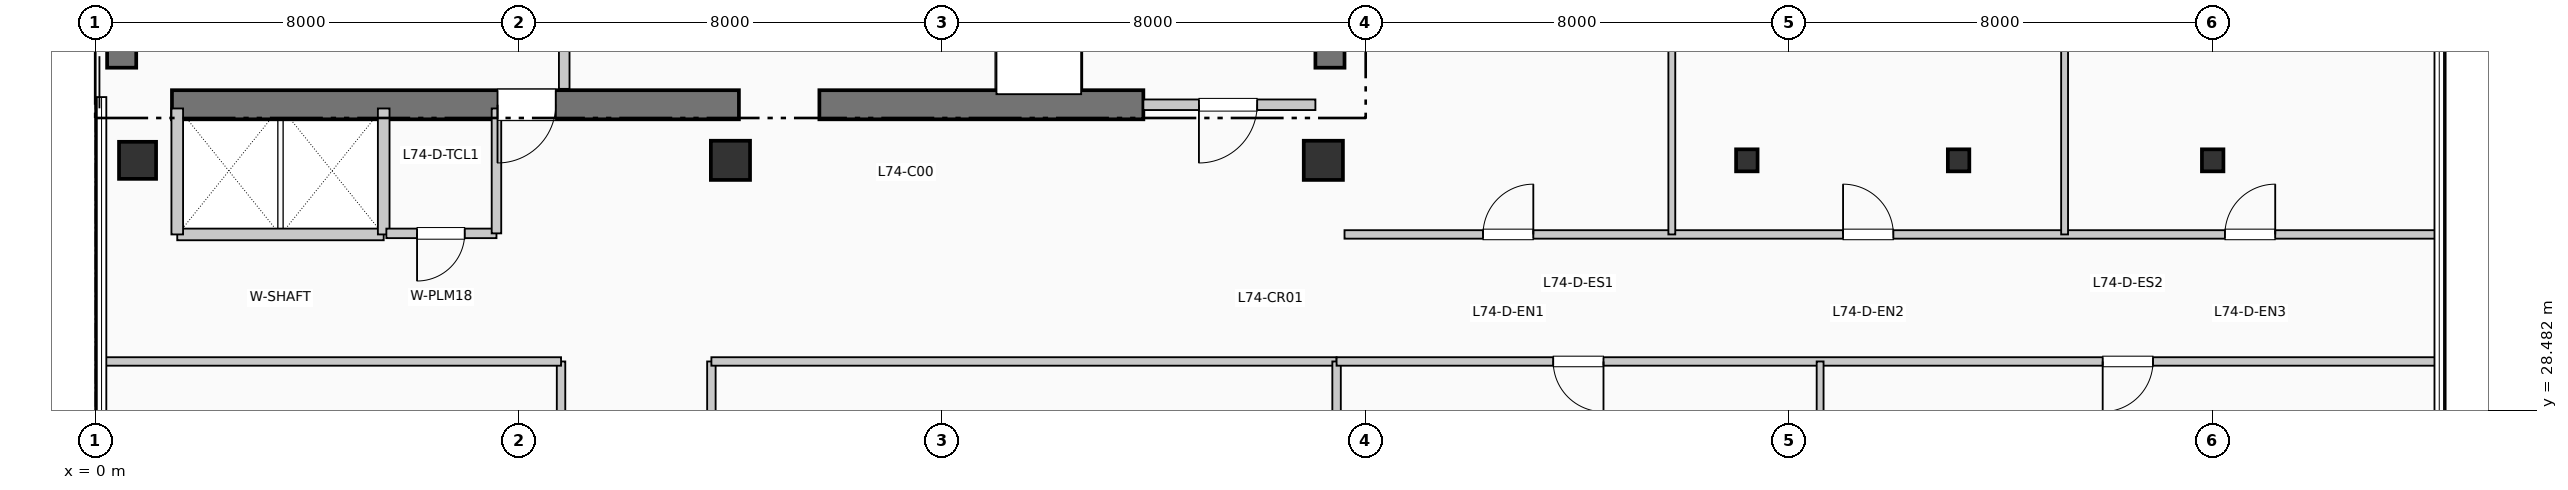
"""IFC4 building model, lengths in metres.
Left out: names, types, materials, properties, quantities, classifications, styles, units other than length and angle.
Written with IfcOpenShell. Run it as: python <this file> out.ifc"""

import sys

from ifc_helpers import new_model, si_unit, direction, frame, frame_2d, origin, origin_2d, place, context, subcontext, project, spatial, rectangle, i_section, extrude, element, fill, save


model = new_model("IFC4")
c1 = context("Model", 3, precision=1e-05, world=origin(), true_north=direction((0.0, 1.0)))
c2 = subcontext(c1, "Body", "Model", "MODEL_VIEW")
j1 = project(units=[si_unit("LENGTHUNIT", "METRE"), si_unit("PLANEANGLEUNIT", "RADIAN")], contexts=[c1])
p1 = place(None, origin())
s1 = spatial("IfcSite", under=j1, at=p1, CompositionType="ELEMENT")
p2 = place(p1, origin())
s2 = spatial("IfcBuilding", under=s1, at=p2, CompositionType="ELEMENT")
p3 = place(p2, frame((0.0, 0.0, 303.93)))
s3 = spatial("IfcBuildingStorey", under=s2, at=p3, CompositionType="ELEMENT", Elevation=303.93)
p4 = place(p3, frame((0.5, 34.95, 0.0), z_axis=(0.0, 0.0, 1.0), x_axis=(0.0, 1.0, 0.0)))
e1 = element("IfcWall", 1, at=p4, inside=s3, PredefinedType="SHEAR", context=c2, shape_type="SweptSolid", body=[
    extrude(rectangle(XDim=7.9, YDim=0.55, at=frame_2d((3.95, 0.0))), origin(), (0.0, 0.0, 1.0), 3.96),
])
p5 = place(p3, frame((23.325, 34.95, 0.0), z_axis=(0.0, 0.0, 1.0), x_axis=(0.0, 1.0, 0.0)))
e2 = element("IfcWall", 2, at=p5, inside=s3, PredefinedType="SHEAR", context=c2, shape_type="SweptSolid", body=[
    extrude(rectangle(XDim=10.64, YDim=0.55, at=frame_2d((5.32, 0.0))), origin(), (0.0, 0.0, 1.0), 3.96),
])
p6 = place(p3, frame((1.45, 34.25, 0.0), z_axis=(0.0, 0.0, 1.0), x_axis=(1.0, 0.0, 0.0)))
e3 = element("IfcWall", 3, at=p6, inside=s3, PredefinedType="SHEAR", context=c2, shape_type="SweptSolid", body=[
    extrude(rectangle(XDim=10.71, YDim=0.55, at=frame_2d((5.355, 0.0))), origin(), (0.0, 0.0, 1.0), 3.96),
])
p7 = place(p6, frame((7.25, 0.0, 0.0), z_axis=(0.0, 0.0, 1.0), x_axis=(-1.0, 0.0, 0.0)))
e4 = element("IfcOpeningElement", 4, at=p7, cuts=e3, PredefinedType="OPENING", context=c2, shape_type="SweptSolid", body=[
    extrude(rectangle(XDim=1.1, YDim=2.15, at=frame_2d((0.55, 1.075))), frame((0.0, 0.285, 0.0), z_axis=(0.0, -1.0, 0.0), x_axis=(1.0, 0.0, 0.0)), (0.0, 0.0, 1.0), 0.57),
])
p8 = place(p3, frame((13.68, 34.25, 0.0), z_axis=(0.0, 0.0, 1.0), x_axis=(1.0, 0.0, 0.0)))
e5 = element("IfcWall", 5, at=p8, inside=s3, PredefinedType="SHEAR", context=c2, shape_type="SweptSolid", body=[
    extrude(rectangle(XDim=6.12, YDim=0.55, at=frame_2d((3.06, 0.0))), origin(), (0.0, 0.0, 1.0), 3.96),
])
p9 = place(p3, frame((0.8, 33.2, 0.0), z_axis=(0.0, 0.0, 1.0), x_axis=(1.0, 0.0, 0.0)))
e6 = element("IfcColumn", 6, at=p9, inside=s3, PredefinedType="COLUMN", context=c2, shape_type="SweptSolid", body=[
    extrude(rectangle(XDim=0.7, YDim=0.7, at=origin_2d()), origin(), (0.0, 0.0, 1.0), 3.96),
])
for number, where, z_axis, x_axis in (
    (7, (12.0, 33.2, 0.0), (0.0, 0.0, 1.0), (1.0, 0.0, 0.0)),
    (8, (23.2, 33.2, 0.0), (0.0, 0.0, 1.0), (1.0, 0.0, 0.0)),
):
    element("IfcColumn", number, at=place(p3, frame(where, z_axis=z_axis, x_axis=x_axis)), inside=s3, PredefinedType="COLUMN", context=c2, shape_type="SweptSolid", body=[
        extrude(rectangle(XDim=0.74, YDim=0.74, at=origin_2d()), origin(), (0.0, 0.0, 1.0), 3.96),
    ])
for number, where, z_axis, x_axis in (
    (9, (31.2, 33.2, 0.0), (0.0, 0.0, 1.0), (1.0, 0.0, 0.0)),
    (10, (35.2, 33.2, 0.0), (0.0, 0.0, 1.0), (1.0, 0.0, 0.0)),
    (11, (40.0, 33.2, 0.0), (0.0, 0.0, 1.0), (1.0, 0.0, 0.0)),
):
    element("IfcColumn", number, at=place(p3, frame(where, z_axis=z_axis, x_axis=x_axis)), inside=s3, PredefinedType="COLUMN", context=c2, shape_type="SweptSolid", body=[
        extrude(i_section(OverallWidth=0.406, OverallDepth=0.416, WebThickness=0.022, FlangeThickness=0.036, at=origin_2d()), origin(), (0.0, 0.0, 1.0), 3.96),
    ])
p10 = place(p3, frame((8.86, 34.55, 0.0), z_axis=(0.0, 0.0, 1.0), x_axis=(0.0, 1.0, 0.0)))
e12 = element("IfcWall", 12, at=p10, inside=s3, PredefinedType="PARTITIONING", context=c2, shape_type="SweptSolid", body=[
    extrude(rectangle(XDim=2.5, YDim=0.2, at=frame_2d((1.25, 0.0))), origin(), (0.0, 0.0, 1.0), 3.74),
])
p11 = place(p3, frame((19.8, 34.25, 0.0), z_axis=(0.0, 0.0, 1.0), x_axis=(1.0, 0.0, 0.0)))
e13 = element("IfcWall", 13, at=p11, inside=s3, PredefinedType="PARTITIONING", context=c2, shape_type="SweptSolid", body=[
    extrude(rectangle(XDim=3.25, YDim=0.2, at=frame_2d((1.625, 0.0))), origin(), (0.0, 0.0, 1.0), 3.74),
])
p12 = place(p11, frame((2.15, 0.0, 0.0), z_axis=(0.0, 0.0, 1.0), x_axis=(-1.0, 0.0, 0.0)))
e14 = element("IfcOpeningElement", 14, at=p12, cuts=e13, PredefinedType="OPENING", context=c2, shape_type="SweptSolid", body=[
    extrude(rectangle(XDim=1.1, YDim=2.15, at=frame_2d((0.55, 1.075))), frame((0.0, 0.11, 0.0), z_axis=(0.0, -1.0, 0.0), x_axis=(1.0, 0.0, 0.0)), (0.0, 0.0, 1.0), 0.22),
])
p13 = place(p3, frame((1.55, 31.8, 0.0), z_axis=(0.0, 0.0, 1.0), x_axis=(1.0, 0.0, 0.0)))
e15 = element("IfcWall", 15, at=p13, inside=s3, PredefinedType="PARTITIONING", context=c2, shape_type="SweptSolid", body=[
    extrude(rectangle(XDim=3.9, YDim=0.22, at=frame_2d((1.95, 0.0))), origin(), (0.0, 0.0, 1.0), 3.74),
])
for number, where, z_axis, x_axis in (
    (16, (1.55, 31.8, 0.0), (0.0, 0.0, 1.0), (0.0, 1.0, 0.0)),
    (17, (5.45, 31.8, 0.0), (0.0, 0.0, 1.0), (0.0, 1.0, 0.0)),
):
    element("IfcWall", number, at=place(p3, frame(where, z_axis=z_axis, x_axis=x_axis)), inside=s3, PredefinedType="PARTITIONING", context=c2, shape_type="SweptSolid", body=[
        extrude(rectangle(XDim=2.38, YDim=0.22, at=frame_2d((1.19, 0.0))), origin(), (0.0, 0.0, 1.0), 3.74),
    ])
p14 = place(p3, frame((5.5, 31.82, 0.0), z_axis=(0.0, 0.0, 1.0), x_axis=(1.0, 0.0, 0.0)))
e18 = element("IfcWall", 18, at=p14, inside=s3, PredefinedType="PLUMBINGWALL", context=c2, shape_type="SweptSolid", body=[
    extrude(rectangle(XDim=2.08, YDim=0.18, at=frame_2d((1.04, 0.0))), origin(), (0.0, 0.0, 1.0), 3.74),
])
p15 = place(p14, frame((1.48, 0.0, 0.0), z_axis=(0.0, 0.0, 1.0), x_axis=(-1.0, 0.0, 0.0)))
e19 = element("IfcOpeningElement", 19, at=p15, cuts=e18, PredefinedType="OPENING", context=c2, shape_type="SweptSolid", body=[
    extrude(rectangle(XDim=0.9, YDim=2.1, at=frame_2d((0.45, 1.05))), frame((0.0, 0.1, 0.0), z_axis=(0.0, -1.0, 0.0), x_axis=(1.0, 0.0, 0.0)), (0.0, 0.0, 1.0), 0.2),
])
p16 = place(p3, frame((7.58, 31.82, 0.0), z_axis=(0.0, 0.0, 1.0), x_axis=(0.0, 1.0, 0.0)))
e20 = element("IfcWall", 20, at=p16, inside=s3, PredefinedType="PLUMBINGWALL", context=c2, shape_type="SweptSolid", body=[
    extrude(rectangle(XDim=2.36, YDim=0.18, at=frame_2d((1.18, 0.0))), origin(), (0.0, 0.0, 1.0), 3.74),
])
p17 = place(p3, frame((8.8, 12.6, 0.0), z_axis=(0.0, 0.0, 1.0), x_axis=(0.0, 1.0, 0.0)))
e21 = element("IfcWall", 21, at=p17, inside=s3, PredefinedType="PARTITIONING", context=c2, shape_type="SweptSolid", body=[
    extrude(rectangle(XDim=16.8, YDim=0.16, at=frame_2d((8.4, 0.0))), origin(), (0.0, 0.0, 1.0), 3.74),
])
p18 = place(p17, frame((4.339, 0.0, 0.0), z_axis=(0.0, 0.0, 1.0), x_axis=(-1.0, 0.0, 0.0)))
e22 = element("IfcOpeningElement", 22, at=p18, cuts=e21, PredefinedType="OPENING", context=c2, shape_type="SweptSolid", body=[
    extrude(rectangle(XDim=0.95, YDim=2.15, at=frame_2d((0.475, 1.075))), frame((0.0, 0.09, 0.0), z_axis=(0.0, -1.0, 0.0), x_axis=(1.0, 0.0, 0.0)), (0.0, 0.0, 1.0), 0.18),
])
p19 = place(p17, frame((12.739, 0.0, 0.0), z_axis=(0.0, 0.0, 1.0), x_axis=(-1.0, 0.0, 0.0)))
e23 = element("IfcOpeningElement", 23, at=p19, cuts=e21, PredefinedType="OPENING", context=c2, shape_type="SweptSolid", body=[
    extrude(rectangle(XDim=0.95, YDim=2.15, at=frame_2d((0.475, 1.075))), frame((0.0, 0.09, 0.0), z_axis=(0.0, -1.0, 0.0), x_axis=(1.0, 0.0, 0.0)), (0.0, 0.0, 1.0), 0.18),
])
p20 = place(p3, frame((11.64, 12.6, 0.0), z_axis=(0.0, 0.0, 1.0), x_axis=(0.0, 1.0, 0.0)))
e24 = element("IfcWall", 24, at=p20, inside=s3, PredefinedType="PARTITIONING", context=c2, shape_type="SweptSolid", body=[
    extrude(rectangle(XDim=16.8, YDim=0.16, at=frame_2d((8.4, 0.0))), origin(), (0.0, 0.0, 1.0), 3.175),
])
p21 = place(p20, frame((3.381, 0.0, 0.0)))
e25 = element("IfcOpeningElement", 25, at=p21, cuts=e24, PredefinedType="OPENING", context=c2, shape_type="SweptSolid", body=[
    extrude(rectangle(XDim=0.95, YDim=2.15, at=frame_2d((0.475, 1.075))), frame((0.0, 0.09, 0.0), z_axis=(0.0, -1.0, 0.0), x_axis=(1.0, 0.0, 0.0)), (0.0, 0.0, 1.0), 0.18),
])
p22 = place(p20, frame((7.593, 0.0, 0.0)))
e26 = element("IfcOpeningElement", 26, at=p22, cuts=e24, PredefinedType="OPENING", context=c2, shape_type="SweptSolid", body=[
    extrude(rectangle(XDim=0.95, YDim=2.15, at=frame_2d((0.475, 1.075))), frame((0.0, 0.09, 0.0), z_axis=(0.0, -1.0, 0.0), x_axis=(1.0, 0.0, 0.0)), (0.0, 0.0, 1.0), 0.18),
])
p23 = place(p20, frame((13.637, 0.0, 0.0)))
e27 = element("IfcOpeningElement", 27, at=p23, cuts=e24, PredefinedType="OPENING", context=c2, shape_type="SweptSolid", body=[
    extrude(rectangle(XDim=0.95, YDim=2.15, at=frame_2d((0.475, 1.075))), frame((0.0, 0.09, 0.0), z_axis=(0.0, -1.0, 0.0), x_axis=(1.0, 0.0, 0.0)), (0.0, 0.0, 1.0), 0.18),
])
p24 = place(p3, frame((0.19, 29.4, 0.0), z_axis=(0.0, 0.0, 1.0), x_axis=(1.0, 0.0, 0.0)))
e28 = element("IfcWall", 28, at=p24, inside=s3, PredefinedType="PARTITIONING", context=c2, shape_type="SweptSolid", body=[
    extrude(rectangle(XDim=8.61, YDim=0.16, at=frame_2d((4.305, 0.0))), origin(), (0.0, 0.0, 1.0), 3.425),
])
p25 = place(p3, frame((11.64, 29.4, 0.0), z_axis=(0.0, 0.0, 1.0), x_axis=(1.0, 0.0, 0.0)))
e29 = element("IfcWall", 29, at=p25, inside=s3, PredefinedType="PARTITIONING", context=c2, shape_type="SweptSolid", body=[
    extrude(rectangle(XDim=11.81, YDim=0.16, at=frame_2d((5.905, 0.0))), origin(), (0.0, 0.0, 1.0), 3.425),
])
p26 = place(p3, frame((23.45, 5.99, 0.0), z_axis=(0.0, 0.0, 1.0), x_axis=(0.0, 1.0, 0.0)))
e30 = element("IfcWall", 30, at=p26, inside=s3, PredefinedType="PARTITIONING", context=c2, shape_type="SweptSolid", body=[
    extrude(rectangle(XDim=23.41, YDim=0.16, at=frame_2d((11.705, 0.0))), origin(), (0.0, 0.0, 1.0), 3.175),
])
p27 = place(p3, frame((23.45, 29.4, 0.0), z_axis=(0.0, 0.0, 1.0), x_axis=(1.0, 0.0, 0.0)))
e31 = element("IfcWall", 31, at=p27, inside=s3, PredefinedType="PARTITIONING", context=c2, shape_type="SweptSolid", body=[
    extrude(rectangle(XDim=20.76, YDim=0.16, at=frame_2d((10.38, 0.0))), origin(), (0.0, 0.0, 1.0), 3.425),
])
p28 = place(p27, frame((5.042, 0.0, 0.0), z_axis=(0.0, 0.0, 1.0), x_axis=(-1.0, 0.0, 0.0)))
e32 = element("IfcOpeningElement", 32, at=p28, cuts=e31, PredefinedType="OPENING", context=c2, shape_type="SweptSolid", body=[
    extrude(rectangle(XDim=0.95, YDim=2.15, at=frame_2d((0.475, 1.075))), frame((0.0, 0.09, 0.0), z_axis=(0.0, -1.0, 0.0), x_axis=(1.0, 0.0, 0.0)), (0.0, 0.0, 1.0), 0.18),
])
p29 = place(p27, frame((15.422, 0.0, 0.0), z_axis=(0.0, 0.0, 1.0), x_axis=(-1.0, 0.0, 0.0)))
e33 = element("IfcOpeningElement", 33, at=p29, cuts=e31, PredefinedType="OPENING", context=c2, shape_type="SweptSolid", body=[
    extrude(rectangle(XDim=0.95, YDim=2.15, at=frame_2d((0.475, 1.075))), frame((0.0, 0.09, 0.0), z_axis=(0.0, -1.0, 0.0), x_axis=(1.0, 0.0, 0.0)), (0.0, 0.0, 1.0), 0.18),
])
p30 = place(p3, frame((23.6, 31.8, 0.0), z_axis=(0.0, 0.0, 1.0), x_axis=(1.0, 0.0, 0.0)))
e34 = element("IfcWall", 34, at=p30, inside=s3, PredefinedType="PARTITIONING", context=c2, shape_type="SweptSolid", body=[
    extrude(rectangle(XDim=20.61, YDim=0.16, at=frame_2d((10.305, 0.0))), origin(), (0.0, 0.0, 1.0), 3.74),
])
p31 = place(p30, frame((2.616, 0.0, 0.0)))
e35 = element("IfcOpeningElement", 35, at=p31, cuts=e34, PredefinedType="OPENING", context=c2, shape_type="SweptSolid", body=[
    extrude(rectangle(XDim=0.95, YDim=2.15, at=frame_2d((0.475, 1.075))), frame((0.0, 0.09, 0.0), z_axis=(0.0, -1.0, 0.0), x_axis=(1.0, 0.0, 0.0)), (0.0, 0.0, 1.0), 0.18),
])
p32 = place(p30, frame((9.418, 0.0, 0.0)))
e36 = element("IfcOpeningElement", 36, at=p32, cuts=e34, PredefinedType="OPENING", context=c2, shape_type="SweptSolid", body=[
    extrude(rectangle(XDim=0.95, YDim=2.15, at=frame_2d((0.475, 1.075))), frame((0.0, 0.09, 0.0), z_axis=(0.0, -1.0, 0.0), x_axis=(1.0, 0.0, 0.0)), (0.0, 0.0, 1.0), 0.18),
])
p33 = place(p30, frame((16.631, 0.0, 0.0)))
e37 = element("IfcOpeningElement", 37, at=p33, cuts=e34, PredefinedType="OPENING", context=c2, shape_type="SweptSolid", body=[
    extrude(rectangle(XDim=0.95, YDim=2.15, at=frame_2d((0.475, 1.075))), frame((0.0, 0.09, 0.0), z_axis=(0.0, -1.0, 0.0), x_axis=(1.0, 0.0, 0.0)), (0.0, 0.0, 1.0), 0.18),
])
p34 = place(p3, frame((32.584, 25.19, 0.0), z_axis=(0.0, 0.0, 1.0), x_axis=(0.0, 1.0, 0.0)))
e38 = element("IfcWall", 38, at=p34, inside=s3, PredefinedType="PARTITIONING", context=c2, shape_type="SweptSolid", body=[
    extrude(rectangle(XDim=4.21, YDim=0.13, at=frame_2d((2.105, 0.0))), origin(), (0.0, 0.0, 1.0), 3.74),
])
for number, where, z_axis, x_axis in (
    (39, (29.783, 31.8, 0.0), (0.0, 0.0, 1.0), (0.0, 1.0, 0.0)),
    (40, (37.203, 31.8, 0.0), (0.0, 0.0, 1.0), (0.0, 1.0, 0.0)),
):
    element("IfcWall", number, at=place(p3, frame(where, z_axis=z_axis, x_axis=x_axis)), inside=s3, PredefinedType="PARTITIONING", context=c2, shape_type="SweptSolid", body=[
        extrude(rectangle(XDim=14.01, YDim=0.13, at=frame_2d((7.005, 0.0))), origin(), (0.0, 0.0, 1.0), 3.74),
    ])
p35 = place(p7, origin())
e41 = element("IfcDoor", 41, at=p35, inside=s3, OperationType="SINGLE_SWING_LEFT", PredefinedType="DOOR", context=c2, shape_type="SweptSolid", body=[
    extrude(rectangle(XDim=1.1, YDim=2.15, at=frame_2d((0.55, 1.075))), frame((0.0, 0.025, 0.0), z_axis=(0.0, -1.0, 0.0), x_axis=(1.0, 0.0, 0.0)), (0.0, 0.0, 1.0), 0.05),
])
fill(e4, e41)
p36 = place(p12, origin())
e42 = element("IfcDoor", 42, at=p36, inside=s3, OperationType="SINGLE_SWING_LEFT", PredefinedType="DOOR", context=c2, shape_type="SweptSolid", body=[
    extrude(rectangle(XDim=1.1, YDim=2.15, at=frame_2d((0.55, 1.075))), frame((0.0, 0.025, 0.0), z_axis=(0.0, -1.0, 0.0), x_axis=(1.0, 0.0, 0.0)), (0.0, 0.0, 1.0), 0.05),
])
fill(e14, e42)
p37 = place(p15, origin())
e43 = element("IfcDoor", 43, at=p37, inside=s3, OperationType="SINGLE_SWING_LEFT", PredefinedType="DOOR", context=c2, shape_type="SweptSolid", body=[
    extrude(rectangle(XDim=0.9, YDim=2.1, at=frame_2d((0.45, 1.05))), frame((0.0, 0.025, 0.0), z_axis=(0.0, -1.0, 0.0), x_axis=(1.0, 0.0, 0.0)), (0.0, 0.0, 1.0), 0.05),
])
fill(e19, e43)
p38 = place(p28, origin())
e44 = element("IfcDoor", 44, at=p38, inside=s3, OperationType="SINGLE_SWING_RIGHT", PredefinedType="DOOR", context=c2, shape_type="SweptSolid", body=[
    extrude(rectangle(XDim=0.95, YDim=2.15, at=frame_2d((0.475, 1.075))), frame((0.0, 0.025, 0.0), z_axis=(0.0, -1.0, 0.0), x_axis=(1.0, 0.0, 0.0)), (0.0, 0.0, 1.0), 0.05),
])
fill(e32, e44)
p39 = place(p29, origin())
e45 = element("IfcDoor", 45, at=p39, inside=s3, OperationType="SINGLE_SWING_LEFT", PredefinedType="DOOR", context=c2, shape_type="SweptSolid", body=[
    extrude(rectangle(XDim=0.95, YDim=2.15, at=frame_2d((0.475, 1.075))), frame((0.0, 0.025, 0.0), z_axis=(0.0, -1.0, 0.0), x_axis=(1.0, 0.0, 0.0)), (0.0, 0.0, 1.0), 0.05),
])
fill(e33, e45)
p40 = place(p31, origin())
e46 = element("IfcDoor", 46, at=p40, inside=s3, OperationType="SINGLE_SWING_RIGHT", PredefinedType="DOOR", context=c2, shape_type="SweptSolid", body=[
    extrude(rectangle(XDim=0.95, YDim=2.15, at=frame_2d((0.475, 1.075))), frame((0.0, 0.025, 0.0), z_axis=(0.0, -1.0, 0.0), x_axis=(1.0, 0.0, 0.0)), (0.0, 0.0, 1.0), 0.05),
])
fill(e35, e46)
p41 = place(p32, origin())
e47 = element("IfcDoor", 47, at=p41, inside=s3, OperationType="SINGLE_SWING_LEFT", PredefinedType="DOOR", context=c2, shape_type="SweptSolid", body=[
    extrude(rectangle(XDim=0.95, YDim=2.15, at=frame_2d((0.475, 1.075))), frame((0.0, 0.025, 0.0), z_axis=(0.0, -1.0, 0.0), x_axis=(1.0, 0.0, 0.0)), (0.0, 0.0, 1.0), 0.05),
])
fill(e36, e47)
p42 = place(p33, origin())
e48 = element("IfcDoor", 48, at=p42, inside=s3, OperationType="SINGLE_SWING_RIGHT", PredefinedType="DOOR", context=c2, shape_type="SweptSolid", body=[
    extrude(rectangle(XDim=0.95, YDim=2.15, at=frame_2d((0.475, 1.075))), frame((0.0, 0.025, 0.0), z_axis=(0.0, -1.0, 0.0), x_axis=(1.0, 0.0, 0.0)), (0.0, 0.0, 1.0), 0.05),
])
fill(e37, e48)
save(model, sys.argv[1])
